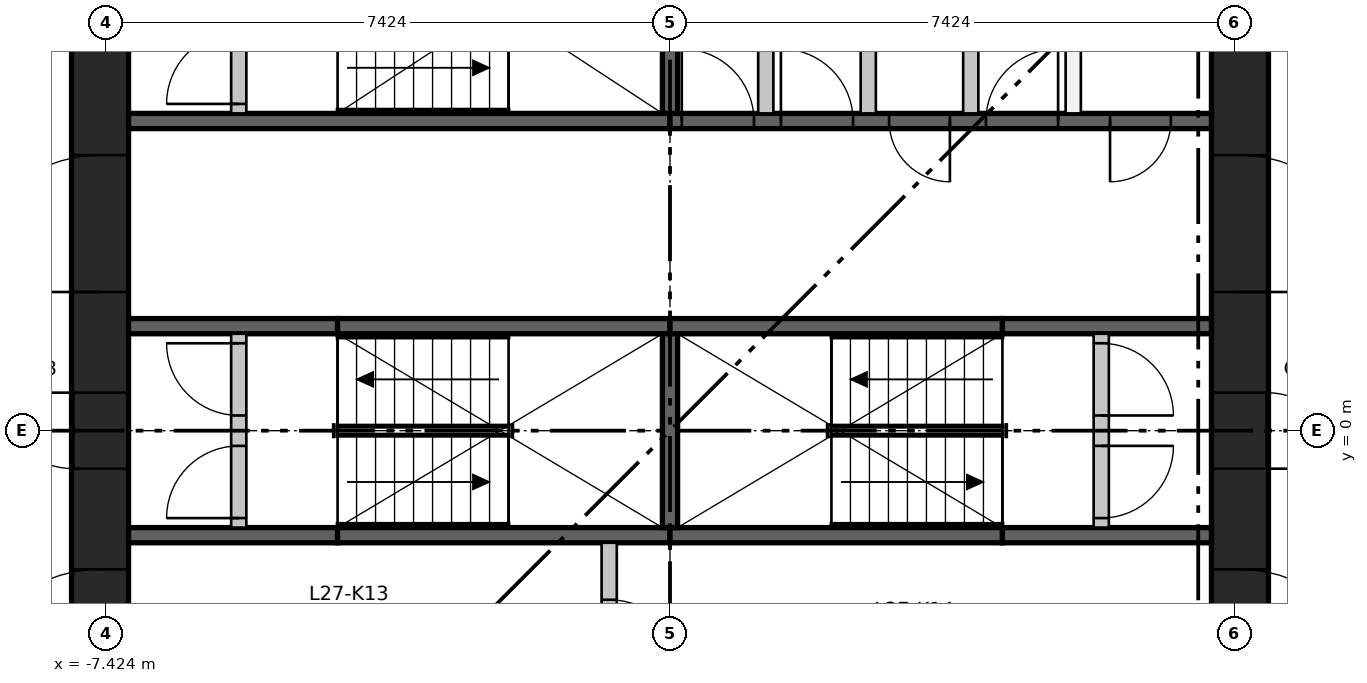
"""IFC4 building model, lengths in metres.
Left out: names, types, materials, properties, quantities, classifications, styles, units other than length and angle.
Written with IfcOpenShell. Run it as: python <this file> out.ifc"""

import sys

from ifc_helpers import new_model, si_unit, direction, frame, frame_2d, origin, place, context, subcontext, project, spatial, rectangle, extrude, element, fill, save


model = new_model("IFC4")
c1 = context("Model", 3, precision=1e-05, world=origin(), true_north=direction((0.0, 1.0)))
c2 = subcontext(c1, "Body", "Model", "MODEL_VIEW")
j1 = project(units=[si_unit("LENGTHUNIT", "METRE"), si_unit("PLANEANGLEUNIT", "RADIAN")], contexts=[c1])
p1 = place(None, origin())
s1 = spatial("IfcSite", under=j1, at=p1, CompositionType="ELEMENT")
p2 = place(p1, origin())
s2 = spatial("IfcBuilding", under=s1, at=p2, CompositionType="ELEMENT")
p3 = place(p2, frame((0.0, 0.0, 105.6)))
s3 = spatial("IfcBuildingStorey", under=s2, at=p3, CompositionType="ELEMENT", Elevation=105.6)
p4 = place(p3, frame((-7.499, -7.124, 0.0), z_axis=(0.0, 0.0, 1.0), x_axis=(0.0, 1.0, 0.0)))
e1 = element("IfcWall", 1, at=p4, inside=s3, PredefinedType="SHEAR", context=c2, shape_type="SweptSolid", body=[
    extrude(rectangle(XDim=14.248, YDim=0.75, at=frame_2d((7.124, 0.0))), origin(), (0.0, 0.0, 1.0), 3.65),
])
p5 = place(p4, frame((6.624, 0.0, 0.0)))
e2 = element("IfcOpeningElement", 2, at=p5, cuts=e1, PredefinedType="OPENING", context=c2, shape_type="SweptSolid", body=[
    extrude(rectangle(XDim=1.0, YDim=2.1, at=frame_2d((0.5, 1.05))), frame((0.0, 0.385, 0.0), z_axis=(0.0, -1.0, 0.0), x_axis=(1.0, 0.0, 0.0)), (0.0, 0.0, 1.0), 0.77),
])
p6 = place(p4, frame((3.5, 0.0, 0.0)))
e3 = element("IfcOpeningElement", 3, at=p6, cuts=e1, PredefinedType="OPENING", context=c2, shape_type="SweptSolid", body=[
    extrude(rectangle(XDim=1.8, YDim=2.1, at=frame_2d((0.9, 1.05))), frame((0.0, 0.385, 0.0), z_axis=(0.0, -1.0, 0.0), x_axis=(1.0, 0.0, 0.0)), (0.0, 0.0, 1.0), 0.77),
])
p7 = place(p4, frame((8.948, 0.0, 0.0)))
e4 = element("IfcOpeningElement", 4, at=p7, cuts=e1, PredefinedType="OPENING", context=c2, shape_type="SweptSolid", body=[
    extrude(rectangle(XDim=1.8, YDim=2.1, at=frame_2d((0.9, 1.05))), frame((0.0, 0.385, 0.0), z_axis=(0.0, -1.0, 0.0), x_axis=(1.0, 0.0, 0.0)), (0.0, 0.0, 1.0), 0.77),
])
p8 = place(p4, frame((12.124, 0.0, 0.0)))
e5 = element("IfcOpeningElement", 5, at=p8, cuts=e1, PredefinedType="OPENING", context=c2, shape_type="SweptSolid", body=[
    extrude(rectangle(XDim=1.0, YDim=2.1, at=frame_2d((0.5, 1.05))), frame((0.0, 0.385, 0.0), z_axis=(0.0, -1.0, 0.0), x_axis=(1.0, 0.0, 0.0)), (0.0, 0.0, 1.0), 0.77),
])
p9 = place(p3, frame((7.499, -7.124, 0.0), z_axis=(0.0, 0.0, 1.0), x_axis=(0.0, 1.0, 0.0)))
e6 = element("IfcWall", 6, at=p9, inside=s3, PredefinedType="SHEAR", context=c2, shape_type="SweptSolid", body=[
    extrude(rectangle(XDim=14.248, YDim=0.75, at=frame_2d((7.124, 0.0))), origin(), (0.0, 0.0, 1.0), 3.65),
])
p10 = place(p9, frame((6.624, 0.0, 0.0)))
e7 = element("IfcOpeningElement", 7, at=p10, cuts=e6, PredefinedType="OPENING", context=c2, shape_type="SweptSolid", body=[
    extrude(rectangle(XDim=1.0, YDim=2.1, at=frame_2d((0.5, 1.05))), frame((0.0, 0.385, 0.0), z_axis=(0.0, -1.0, 0.0), x_axis=(1.0, 0.0, 0.0)), (0.0, 0.0, 1.0), 0.77),
])
p11 = place(p9, frame((3.5, 0.0, 0.0)))
e8 = element("IfcOpeningElement", 8, at=p11, cuts=e6, PredefinedType="OPENING", context=c2, shape_type="SweptSolid", body=[
    extrude(rectangle(XDim=1.8, YDim=2.1, at=frame_2d((0.9, 1.05))), frame((0.0, 0.385, 0.0), z_axis=(0.0, -1.0, 0.0), x_axis=(1.0, 0.0, 0.0)), (0.0, 0.0, 1.0), 0.77),
])
p12 = place(p9, frame((8.948, 0.0, 0.0)))
e9 = element("IfcOpeningElement", 9, at=p12, cuts=e6, PredefinedType="OPENING", context=c2, shape_type="SweptSolid", body=[
    extrude(rectangle(XDim=1.8, YDim=2.1, at=frame_2d((0.9, 1.05))), frame((0.0, 0.385, 0.0), z_axis=(0.0, -1.0, 0.0), x_axis=(1.0, 0.0, 0.0)), (0.0, 0.0, 1.0), 0.77),
])
p13 = place(p3, frame((-7.124, 4.074, 0.0), z_axis=(0.0, 0.0, 1.0), x_axis=(1.0, 0.0, 0.0)))
e10 = element("IfcWall", 10, at=p13, inside=s3, PredefinedType="SHEAR", context=c2, shape_type="SweptSolid", body=[
    extrude(rectangle(XDim=7.124, YDim=0.2, at=frame_2d((3.562, 0.0))), origin(), (0.0, 0.0, 1.0), 3.3),
])
p14 = place(p3, frame((0.0, 4.074, 0.0), z_axis=(0.0, 0.0, 1.0), x_axis=(1.0, 0.0, 0.0)))
e11 = element("IfcWall", 11, at=p14, inside=s3, PredefinedType="SHEAR", context=c2, shape_type="SweptSolid", body=[
    extrude(rectangle(XDim=7.124, YDim=0.2, at=frame_2d((3.562, 0.0))), origin(), (0.0, 0.0, 1.0), 3.3),
])
p15 = place(p14, frame((0.155, 0.0, 0.0)))
e12 = element("IfcOpeningElement", 12, at=p15, cuts=e11, PredefinedType="OPENING", context=c2, shape_type="SweptSolid", body=[
    extrude(rectangle(XDim=0.95, YDim=2.1, at=frame_2d((0.475, 1.05))), frame((0.0, 0.11, 0.0), z_axis=(0.0, -1.0, 0.0), x_axis=(1.0, 0.0, 0.0)), (0.0, 0.0, 1.0), 0.22),
])
p16 = place(p14, frame((1.459, 0.0, 0.0)))
e13 = element("IfcOpeningElement", 13, at=p16, cuts=e11, PredefinedType="OPENING", context=c2, shape_type="SweptSolid", body=[
    extrude(rectangle(XDim=0.95, YDim=2.1, at=frame_2d((0.475, 1.05))), frame((0.0, 0.11, 0.0), z_axis=(0.0, -1.0, 0.0), x_axis=(1.0, 0.0, 0.0)), (0.0, 0.0, 1.0), 0.22),
])
p17 = place(p14, frame((2.883, 0.0, 0.0)))
e14 = element("IfcOpeningElement", 14, at=p17, cuts=e11, PredefinedType="OPENING", context=c2, shape_type="SweptSolid", body=[
    extrude(rectangle(XDim=0.8, YDim=2.1, at=frame_2d((0.4, 1.05))), frame((0.0, 0.11, 0.0), z_axis=(0.0, -1.0, 0.0), x_axis=(1.0, 0.0, 0.0)), (0.0, 0.0, 1.0), 0.22),
])
p18 = place(p14, frame((4.156, 0.0, 0.0)))
e15 = element("IfcOpeningElement", 15, at=p18, cuts=e11, PredefinedType="OPENING", context=c2, shape_type="SweptSolid", body=[
    extrude(rectangle(XDim=0.95, YDim=2.1, at=frame_2d((0.475, 1.05))), frame((0.0, 0.11, 0.0), z_axis=(0.0, -1.0, 0.0), x_axis=(1.0, 0.0, 0.0)), (0.0, 0.0, 1.0), 0.22),
])
p19 = place(p14, frame((5.79, 0.0, 0.0)))
e16 = element("IfcOpeningElement", 16, at=p19, cuts=e11, PredefinedType="OPENING", context=c2, shape_type="SweptSolid", body=[
    extrude(rectangle(XDim=0.8, YDim=2.1, at=frame_2d((0.4, 1.05))), frame((0.0, 0.11, 0.0), z_axis=(0.0, -1.0, 0.0), x_axis=(1.0, 0.0, 0.0)), (0.0, 0.0, 1.0), 0.22),
])
p20 = place(p3, frame((-7.124, -1.375, 0.0), z_axis=(0.0, 0.0, 1.0), x_axis=(1.0, 0.0, 0.0)))
e17 = element("IfcWall", 17, at=p20, inside=s3, PredefinedType="SHEAR", context=c2, shape_type="SweptSolid", body=[
    extrude(rectangle(XDim=2.75, YDim=0.2, at=frame_2d((1.375, 0.0))), origin(), (0.0, 0.0, 1.0), 3.3),
])
for number, where, z_axis, x_axis in (
    (18, (-4.374, -1.375, 0.0), (0.0, 0.0, 1.0), (1.0, 0.0, 0.0)),
    (19, (0.0, -1.375, 0.0), (0.0, 0.0, 1.0), (1.0, 0.0, 0.0)),
):
    element("IfcWall", number, at=place(p3, frame(where, z_axis=z_axis, x_axis=x_axis)), inside=s3, PredefinedType="SHEAR", context=c2, shape_type="SweptSolid", body=[
        extrude(rectangle(XDim=4.374, YDim=0.2, at=frame_2d((2.187, 0.0))), origin(), (0.0, 0.0, 1.0), 3.3),
    ])
for number, where, z_axis, x_axis in (
    (20, (4.374, -1.375, 0.0), (0.0, 0.0, 1.0), (1.0, 0.0, 0.0)),
    (21, (-7.124, 1.375, 0.0), (0.0, 0.0, 1.0), (1.0, 0.0, 0.0)),
):
    element("IfcWall", number, at=place(p3, frame(where, z_axis=z_axis, x_axis=x_axis)), inside=s3, PredefinedType="SHEAR", context=c2, shape_type="SweptSolid", body=[
        extrude(rectangle(XDim=2.75, YDim=0.2, at=frame_2d((1.375, 0.0))), origin(), (0.0, 0.0, 1.0), 3.3),
    ])
for number, where, z_axis, x_axis in (
    (22, (-4.374, 1.375, 0.0), (0.0, 0.0, 1.0), (1.0, 0.0, 0.0)),
    (23, (0.0, 1.375, 0.0), (0.0, 0.0, 1.0), (1.0, 0.0, 0.0)),
):
    element("IfcWall", number, at=place(p3, frame(where, z_axis=z_axis, x_axis=x_axis)), inside=s3, PredefinedType="SHEAR", context=c2, shape_type="SweptSolid", body=[
        extrude(rectangle(XDim=4.374, YDim=0.2, at=frame_2d((2.187, 0.0))), origin(), (0.0, 0.0, 1.0), 3.3),
    ])
p21 = place(p3, frame((4.374, 1.375, 0.0), z_axis=(0.0, 0.0, 1.0), x_axis=(1.0, 0.0, 0.0)))
e24 = element("IfcWall", 24, at=p21, inside=s3, PredefinedType="SHEAR", context=c2, shape_type="SweptSolid", body=[
    extrude(rectangle(XDim=2.75, YDim=0.2, at=frame_2d((1.375, 0.0))), origin(), (0.0, 0.0, 1.0), 3.3),
])
p22 = place(p3, frame((0.0, -1.275, 0.0), z_axis=(0.0, 0.0, 1.0), x_axis=(0.0, 1.0, 0.0)))
e25 = element("IfcWall", 25, at=p22, inside=s3, PredefinedType="SHEAR", context=c2, shape_type="SweptSolid", body=[
    extrude(rectangle(XDim=2.55, YDim=0.2, at=frame_2d((1.275, 0.0))), origin(), (0.0, 0.0, 1.0), 3.3),
])
p23 = place(p3, frame((-0.8, -3.974, 0.0), z_axis=(0.0, 0.0, 1.0), x_axis=(0.0, 1.0, 0.0)))
e26 = element("IfcWall", 26, at=p23, inside=s3, PredefinedType="PARTITIONING", context=c2, shape_type="SweptSolid", body=[
    extrude(rectangle(XDim=2.499, YDim=0.2, at=frame_2d((1.25, 0.0))), origin(), (0.0, 0.0, 1.0), 3.3),
])
p24 = place(p23, frame((0.75, 0.0, 0.0)))
e27 = element("IfcOpeningElement", 27, at=p24, cuts=e26, PredefinedType="OPENING", context=c2, shape_type="SweptSolid", body=[
    extrude(rectangle(XDim=1.0, YDim=2.1, at=frame_2d((0.5, 1.05))), frame((0.0, 0.11, 0.0), z_axis=(0.0, -1.0, 0.0), x_axis=(1.0, 0.0, 0.0)), (0.0, 0.0, 1.0), 0.22),
])
p25 = place(p3, frame((0.0, 4.174, 0.0), z_axis=(0.0, 0.0, 1.0), x_axis=(0.0, 1.0, 0.0)))
e28 = element("IfcWall", 28, at=p25, inside=s3, PredefinedType="SHEAR", context=c2, shape_type="SweptSolid", body=[
    extrude(rectangle(XDim=1.4, YDim=0.2, at=frame_2d((0.7, 0.0))), origin(), (0.0, 0.0, 1.0), 3.3),
])
for number, where, z_axis, x_axis in (
    (29, (1.26, 4.174, 0.0), (0.0, 0.0, 1.0), (0.0, 1.0, 0.0)),
    (30, (2.609, 4.174, 0.0), (0.0, 0.0, 1.0), (0.0, 1.0, 0.0)),
    (31, (3.957, 4.174, 0.0), (0.0, 0.0, 1.0), (0.0, 1.0, 0.0)),
    (32, (5.305, 4.174, 0.0), (0.0, 0.0, 1.0), (0.0, 1.0, 0.0)),
):
    element("IfcWall", number, at=place(p3, frame(where, z_axis=z_axis, x_axis=x_axis)), inside=s3, PredefinedType="PARTITIONING", context=c2, shape_type="SweptSolid", body=[
        extrude(rectangle(XDim=2.95, YDim=0.2, at=frame_2d((1.475, 0.0))), origin(), (0.0, 0.0, 1.0), 3.3),
    ])
p26 = place(p3, frame((-5.674, -1.275, 0.0), z_axis=(0.0, 0.0, 1.0), x_axis=(0.0, 1.0, 0.0)))
e33 = element("IfcWall", 33, at=p26, inside=s3, PredefinedType="PARTITIONING", context=c2, shape_type="SweptSolid", body=[
    extrude(rectangle(XDim=2.55, YDim=0.2, at=frame_2d((1.275, 0.0))), origin(), (0.0, 0.0, 1.0), 3.3),
])
p27 = place(p26, frame((0.125, 0.0, 0.0)))
e34 = element("IfcOpeningElement", 34, at=p27, cuts=e33, PredefinedType="OPENING", context=c2, shape_type="SweptSolid", body=[
    extrude(rectangle(XDim=0.95, YDim=2.1, at=frame_2d((0.475, 1.05))), frame((0.0, 0.11, 0.0), z_axis=(0.0, -1.0, 0.0), x_axis=(1.0, 0.0, 0.0)), (0.0, 0.0, 1.0), 0.22),
])
p28 = place(p26, frame((1.475, 0.0, 0.0)))
e35 = element("IfcOpeningElement", 35, at=p28, cuts=e33, PredefinedType="OPENING", context=c2, shape_type="SweptSolid", body=[
    extrude(rectangle(XDim=0.95, YDim=2.1, at=frame_2d((0.475, 1.05))), frame((0.0, 0.11, 0.0), z_axis=(0.0, -1.0, 0.0), x_axis=(1.0, 0.0, 0.0)), (0.0, 0.0, 1.0), 0.22),
])
p29 = place(p3, frame((5.674, -1.275, 0.0), z_axis=(0.0, 0.0, 1.0), x_axis=(0.0, 1.0, 0.0)))
e36 = element("IfcWall", 36, at=p29, inside=s3, PredefinedType="PARTITIONING", context=c2, shape_type="SweptSolid", body=[
    extrude(rectangle(XDim=2.55, YDim=0.2, at=frame_2d((1.275, 0.0))), origin(), (0.0, 0.0, 1.0), 3.3),
])
p30 = place(p29, frame((0.125, 0.0, 0.0)))
e37 = element("IfcOpeningElement", 37, at=p30, cuts=e36, PredefinedType="OPENING", context=c2, shape_type="SweptSolid", body=[
    extrude(rectangle(XDim=0.95, YDim=2.1, at=frame_2d((0.475, 1.05))), frame((0.0, 0.11, 0.0), z_axis=(0.0, -1.0, 0.0), x_axis=(1.0, 0.0, 0.0)), (0.0, 0.0, 1.0), 0.22),
])
p31 = place(p29, frame((1.475, 0.0, 0.0)))
e38 = element("IfcOpeningElement", 38, at=p31, cuts=e36, PredefinedType="OPENING", context=c2, shape_type="SweptSolid", body=[
    extrude(rectangle(XDim=0.95, YDim=2.1, at=frame_2d((0.475, 1.05))), frame((0.0, 0.11, 0.0), z_axis=(0.0, -1.0, 0.0), x_axis=(1.0, 0.0, 0.0)), (0.0, 0.0, 1.0), 0.22),
])
p32 = place(p3, frame((-5.674, 4.174, 0.0), z_axis=(0.0, 0.0, 1.0), x_axis=(0.0, 1.0, 0.0)))
e39 = element("IfcWall", 39, at=p32, inside=s3, PredefinedType="PARTITIONING", context=c2, shape_type="SweptSolid", body=[
    extrude(rectangle(XDim=2.95, YDim=0.2, at=frame_2d((1.475, 0.0))), origin(), (0.0, 0.0, 1.0), 3.3),
])
p33 = place(p32, frame((0.125, 0.0, 0.0)))
e40 = element("IfcOpeningElement", 40, at=p33, cuts=e39, PredefinedType="OPENING", context=c2, shape_type="SweptSolid", body=[
    extrude(rectangle(XDim=0.95, YDim=2.1, at=frame_2d((0.475, 1.05))), frame((0.0, 0.11, 0.0), z_axis=(0.0, -1.0, 0.0), x_axis=(1.0, 0.0, 0.0)), (0.0, 0.0, 1.0), 0.22),
])
p34 = place(p32, frame((1.725, 0.0, 0.0)))
e41 = element("IfcOpeningElement", 41, at=p34, cuts=e39, PredefinedType="OPENING", context=c2, shape_type="SweptSolid", body=[
    extrude(rectangle(XDim=0.95, YDim=2.1, at=frame_2d((0.475, 1.05))), frame((0.0, 0.11, 0.0), z_axis=(0.0, -1.0, 0.0), x_axis=(1.0, 0.0, 0.0)), (0.0, 0.0, 1.0), 0.22),
])
p35 = place(p27, origin())
e42 = element("IfcDoor", 42, at=p35, inside=s3, OperationType="SINGLE_SWING_LEFT", PredefinedType="DOOR", context=c2, shape_type="SweptSolid", body=[
    extrude(rectangle(XDim=0.95, YDim=2.1, at=frame_2d((0.475, 1.05))), frame((0.0, 0.025, 0.0), z_axis=(0.0, -1.0, 0.0), x_axis=(1.0, 0.0, 0.0)), (0.0, 0.0, 1.0), 0.05),
])
fill(e34, e42)
p36 = place(p28, origin())
e43 = element("IfcDoor", 43, at=p36, inside=s3, OperationType="SINGLE_SWING_RIGHT", PredefinedType="DOOR", context=c2, shape_type="SweptSolid", body=[
    extrude(rectangle(XDim=0.95, YDim=2.1, at=frame_2d((0.475, 1.05))), frame((0.0, 0.025, 0.0), z_axis=(0.0, -1.0, 0.0), x_axis=(1.0, 0.0, 0.0)), (0.0, 0.0, 1.0), 0.05),
])
fill(e35, e43)
p37 = place(p30, frame((0.95, 0.0, 0.0), z_axis=(0.0, 0.0, 1.0), x_axis=(-1.0, 0.0, 0.0)))
e44 = element("IfcDoor", 44, at=p37, inside=s3, OperationType="SINGLE_SWING_RIGHT", PredefinedType="DOOR", context=c2, shape_type="SweptSolid", body=[
    extrude(rectangle(XDim=0.95, YDim=2.1, at=frame_2d((0.475, 1.05))), frame((0.0, 0.025, 0.0), z_axis=(0.0, -1.0, 0.0), x_axis=(1.0, 0.0, 0.0)), (0.0, 0.0, 1.0), 0.05),
])
fill(e37, e44)
p38 = place(p31, frame((0.95, 0.0, 0.0), z_axis=(0.0, 0.0, 1.0), x_axis=(-1.0, 0.0, 0.0)))
e45 = element("IfcDoor", 45, at=p38, inside=s3, OperationType="SINGLE_SWING_LEFT", PredefinedType="DOOR", context=c2, shape_type="SweptSolid", body=[
    extrude(rectangle(XDim=0.95, YDim=2.1, at=frame_2d((0.475, 1.05))), frame((0.0, 0.025, 0.0), z_axis=(0.0, -1.0, 0.0), x_axis=(1.0, 0.0, 0.0)), (0.0, 0.0, 1.0), 0.05),
])
fill(e38, e45)
p39 = place(p33, origin())
e46 = element("IfcDoor", 46, at=p39, inside=s3, OperationType="SINGLE_SWING_LEFT", PredefinedType="DOOR", context=c2, shape_type="SweptSolid", body=[
    extrude(rectangle(XDim=0.95, YDim=2.1, at=frame_2d((0.475, 1.05))), frame((0.0, 0.025, 0.0), z_axis=(0.0, -1.0, 0.0), x_axis=(1.0, 0.0, 0.0)), (0.0, 0.0, 1.0), 0.05),
])
fill(e40, e46)
p40 = place(p24, frame((1.0, 0.0, 0.0), z_axis=(0.0, 0.0, 1.0), x_axis=(-1.0, 0.0, 0.0)))
e47 = element("IfcDoor", 47, at=p40, inside=s3, OperationType="SINGLE_SWING_LEFT", PredefinedType="DOOR", context=c2, shape_type="SweptSolid", body=[
    extrude(rectangle(XDim=1.0, YDim=2.1, at=frame_2d((0.5, 1.05))), frame((0.0, 0.025, 0.0), z_axis=(0.0, -1.0, 0.0), x_axis=(1.0, 0.0, 0.0)), (0.0, 0.0, 1.0), 0.05),
])
fill(e27, e47)
p41 = place(p15, origin())
e48 = element("IfcDoor", 48, at=p41, inside=s3, OperationType="SINGLE_SWING_LEFT", PredefinedType="DOOR", context=c2, shape_type="SweptSolid", body=[
    extrude(rectangle(XDim=0.95, YDim=2.1, at=frame_2d((0.475, 1.05))), frame((0.0, 0.025, 0.0), z_axis=(0.0, -1.0, 0.0), x_axis=(1.0, 0.0, 0.0)), (0.0, 0.0, 1.0), 0.05),
])
fill(e12, e48)
p42 = place(p16, origin())
e49 = element("IfcDoor", 49, at=p42, inside=s3, OperationType="SINGLE_SWING_LEFT", PredefinedType="DOOR", context=c2, shape_type="SweptSolid", body=[
    extrude(rectangle(XDim=0.95, YDim=2.1, at=frame_2d((0.475, 1.05))), frame((0.0, 0.025, 0.0), z_axis=(0.0, -1.0, 0.0), x_axis=(1.0, 0.0, 0.0)), (0.0, 0.0, 1.0), 0.05),
])
fill(e13, e49)
p43 = place(p17, frame((0.8, 0.0, 0.0), z_axis=(0.0, 0.0, 1.0), x_axis=(-1.0, 0.0, 0.0)))
e50 = element("IfcDoor", 50, at=p43, inside=s3, OperationType="SINGLE_SWING_RIGHT", PredefinedType="DOOR", context=c2, shape_type="SweptSolid", body=[
    extrude(rectangle(XDim=0.8, YDim=2.1, at=frame_2d((0.4, 1.05))), frame((0.0, 0.025, 0.0), z_axis=(0.0, -1.0, 0.0), x_axis=(1.0, 0.0, 0.0)), (0.0, 0.0, 1.0), 0.05),
])
fill(e14, e50)
p44 = place(p18, origin())
e51 = element("IfcDoor", 51, at=p44, inside=s3, OperationType="SINGLE_SWING_RIGHT", PredefinedType="DOOR", context=c2, shape_type="SweptSolid", body=[
    extrude(rectangle(XDim=0.95, YDim=2.1, at=frame_2d((0.475, 1.05))), frame((0.0, 0.025, 0.0), z_axis=(0.0, -1.0, 0.0), x_axis=(1.0, 0.0, 0.0)), (0.0, 0.0, 1.0), 0.05),
])
fill(e15, e51)
p45 = place(p19, frame((0.8, 0.0, 0.0), z_axis=(0.0, 0.0, 1.0), x_axis=(-1.0, 0.0, 0.0)))
e52 = element("IfcDoor", 52, at=p45, inside=s3, OperationType="SINGLE_SWING_LEFT", PredefinedType="DOOR", context=c2, shape_type="SweptSolid", body=[
    extrude(rectangle(XDim=0.8, YDim=2.1, at=frame_2d((0.4, 1.05))), frame((0.0, 0.025, 0.0), z_axis=(0.0, -1.0, 0.0), x_axis=(1.0, 0.0, 0.0)), (0.0, 0.0, 1.0), 0.05),
])
fill(e16, e52)
p46 = place(p5, origin())
e53 = element("IfcDoor", 53, at=p46, inside=s3, OperationType="SINGLE_SWING_RIGHT", PredefinedType="DOOR", context=c2, shape_type="SweptSolid", body=[
    extrude(rectangle(XDim=1.0, YDim=2.1, at=frame_2d((0.5, 1.05))), frame((0.0, 0.375, 0.0), z_axis=(0.0, -1.0, 0.0), x_axis=(1.0, 0.0, 0.0)), (0.0, 0.0, 1.0), 0.05),
])
fill(e2, e53)
p47 = place(p6, origin())
e54 = element("IfcDoor", 54, at=p47, inside=s3, OperationType="DOUBLE_DOOR_SINGLE_SWING", PredefinedType="DOOR", context=c2, shape_type="SweptSolid", body=[
    extrude(rectangle(XDim=1.8, YDim=2.1, at=frame_2d((0.9, 1.05))), frame((0.0, 0.025, 0.0), z_axis=(0.0, -1.0, 0.0), x_axis=(1.0, 0.0, 0.0)), (0.0, 0.0, 1.0), 0.05),
])
fill(e3, e54)
p48 = place(p7, origin())
e55 = element("IfcDoor", 55, at=p48, inside=s3, OperationType="DOUBLE_DOOR_SINGLE_SWING", PredefinedType="DOOR", context=c2, shape_type="SweptSolid", body=[
    extrude(rectangle(XDim=1.8, YDim=2.1, at=frame_2d((0.9, 1.05))), frame((0.0, 0.025, 0.0), z_axis=(0.0, -1.0, 0.0), x_axis=(1.0, 0.0, 0.0)), (0.0, 0.0, 1.0), 0.05),
])
fill(e4, e55)
p49 = place(p10, frame((1.0, 0.0, 0.0), z_axis=(0.0, 0.0, 1.0), x_axis=(-1.0, 0.0, 0.0)))
e56 = element("IfcDoor", 56, at=p49, inside=s3, OperationType="SINGLE_SWING_LEFT", PredefinedType="DOOR", context=c2, shape_type="SweptSolid", body=[
    extrude(rectangle(XDim=1.0, YDim=2.1, at=frame_2d((0.5, 1.05))), frame((0.0, 0.375, 0.0), z_axis=(0.0, -1.0, 0.0), x_axis=(1.0, 0.0, 0.0)), (0.0, 0.0, 1.0), 0.05),
])
fill(e7, e56)
p50 = place(p11, frame((1.8, 0.0, 0.0), z_axis=(0.0, 0.0, 1.0), x_axis=(-1.0, 0.0, 0.0)))
e57 = element("IfcDoor", 57, at=p50, inside=s3, OperationType="DOUBLE_DOOR_SINGLE_SWING", PredefinedType="DOOR", context=c2, shape_type="SweptSolid", body=[
    extrude(rectangle(XDim=1.8, YDim=2.1, at=frame_2d((0.9, 1.05))), frame((0.0, 0.025, 0.0), z_axis=(0.0, -1.0, 0.0), x_axis=(1.0, 0.0, 0.0)), (0.0, 0.0, 1.0), 0.05),
])
fill(e8, e57)
p51 = place(p12, frame((1.8, 0.0, 0.0), z_axis=(0.0, 0.0, 1.0), x_axis=(-1.0, 0.0, 0.0)))
e58 = element("IfcDoor", 58, at=p51, inside=s3, OperationType="DOUBLE_DOOR_SINGLE_SWING", PredefinedType="DOOR", context=c2, shape_type="SweptSolid", body=[
    extrude(rectangle(XDim=1.8, YDim=2.1, at=frame_2d((0.9, 1.05))), frame((0.0, 0.025, 0.0), z_axis=(0.0, -1.0, 0.0), x_axis=(1.0, 0.0, 0.0)), (0.0, 0.0, 1.0), 0.05),
])
fill(e9, e58)
save(model, sys.argv[1])
